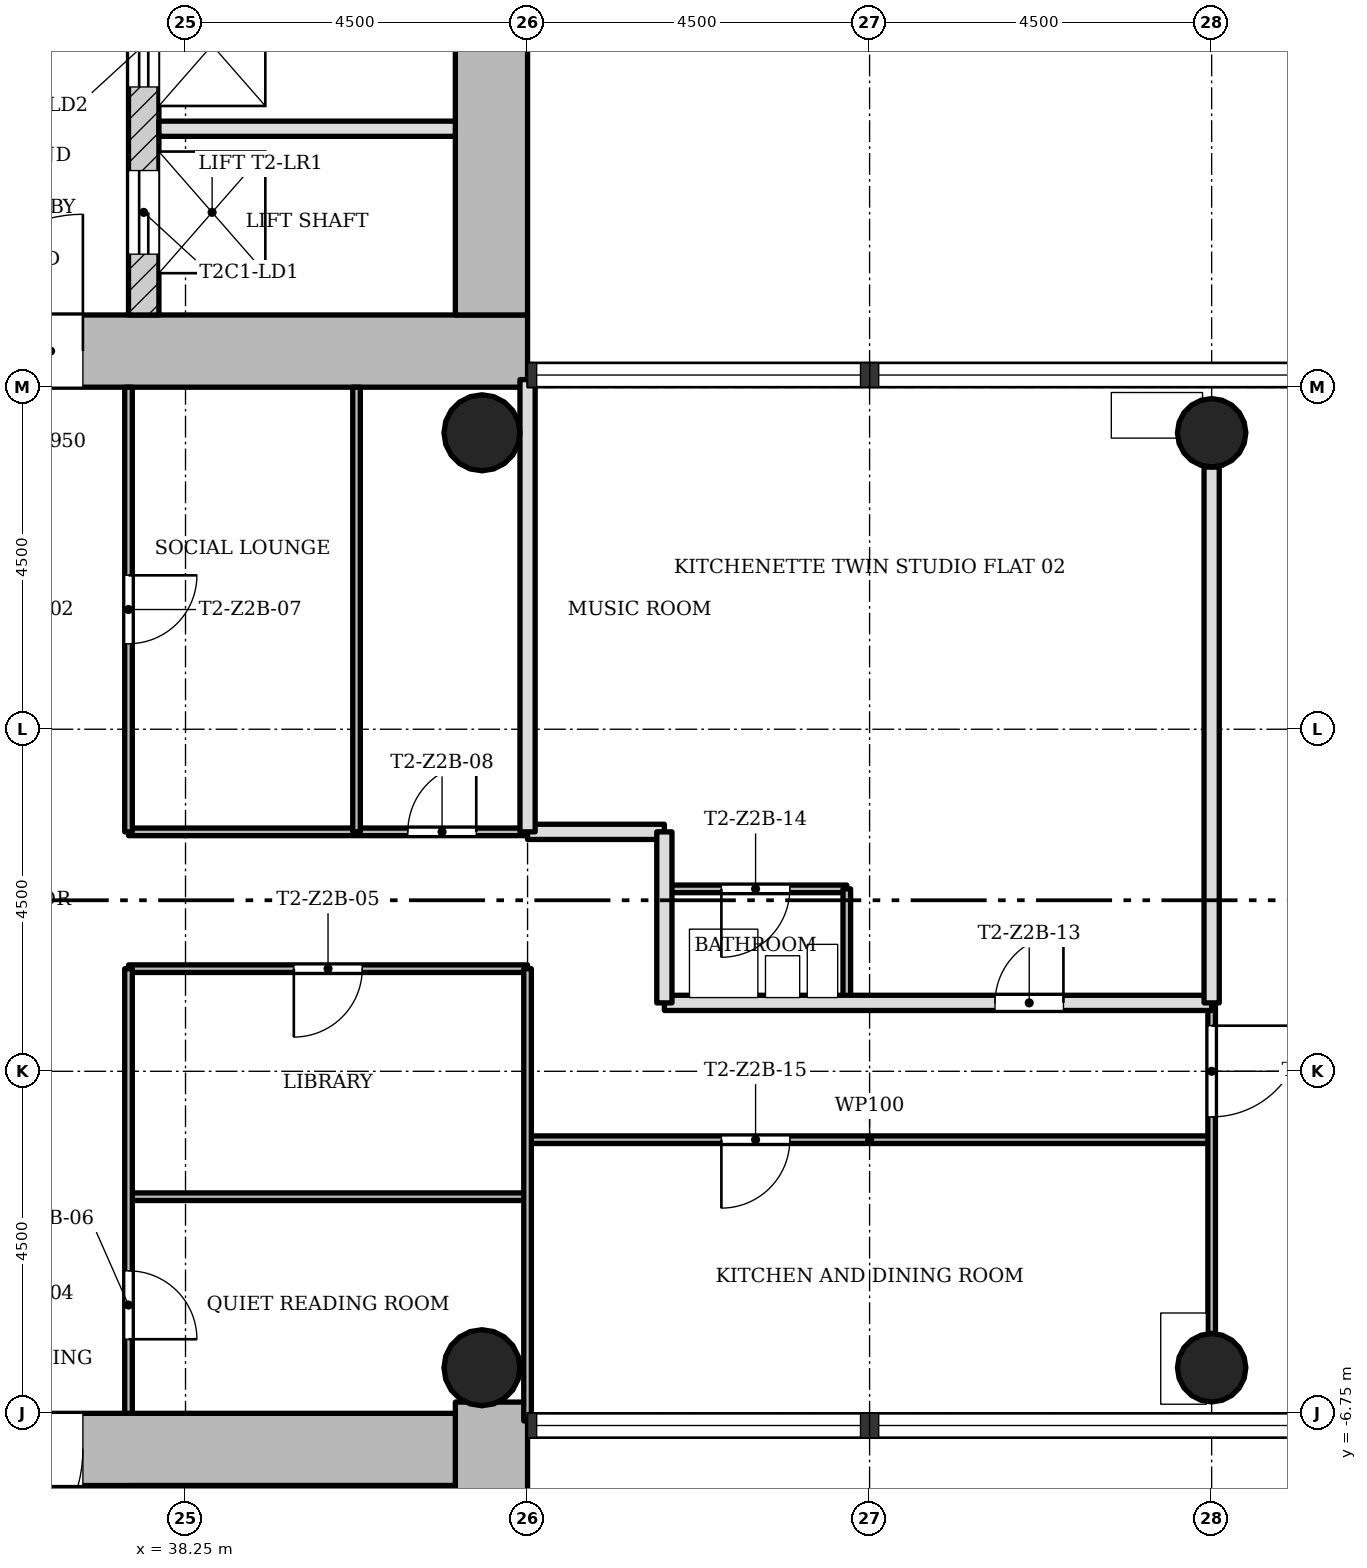
"""IFC4 building model, lengths in metres.
Left out: names, types, materials, properties, quantities, classifications, styles, units other than length and angle.
Written with IfcOpenShell. Run it as: python <this file> out.ifc"""

import sys

from ifc_helpers import new_model, si_unit, direction, frame, frame_2d, origin, origin_2d, place, context, subcontext, project, spatial, rectangle, hollow_circle, extrude, element, fill, save


model = new_model("IFC4")
c1 = context("Model", 3, precision=1e-05, world=origin(), true_north=direction((0.0, 1.0)))
c2 = subcontext(c1, "Body", "Model", "MODEL_VIEW")
j1 = project(units=[si_unit("LENGTHUNIT", "METRE"), si_unit("PLANEANGLEUNIT", "RADIAN")], contexts=[c1])
p1 = place(None, origin())
s1 = spatial("IfcSite", under=j1, at=p1, CompositionType="ELEMENT")
p2 = place(p1, origin())
s2 = spatial("IfcBuilding", under=s1, at=p2, CompositionType="ELEMENT")
p3 = place(p2, frame((0.0, 0.0, 76.6)))
s3 = spatial("IfcBuildingStorey", under=s2, at=p3, CompositionType="ELEMENT", Elevation=76.6)
p4 = place(p3, frame((30.2, 7.225, 0.0), z_axis=(0.0, 0.0, 1.0), x_axis=(1.0, 0.0, 0.0)))
e1 = element("IfcWall", 1, at=p4, inside=s3, PredefinedType="SHEAR", context=c2, shape_type="SweptSolid", body=[
    extrude(rectangle(XDim=12.55, YDim=0.95, at=frame_2d((6.275, 0.0))), origin(), (0.0, 0.0, 1.0), 3.4),
])
p5 = place(p4, frame((4.9, 0.0, 0.0)))
e2 = element("IfcOpeningElement", 2, at=p5, cuts=e1, PredefinedType="OPENING", context=c2, shape_type="SweptSolid", body=[
    extrude(rectangle(XDim=1.8, YDim=2.1, at=frame_2d((0.9, 1.05))), frame((0.0, 0.485, 0.0), z_axis=(0.0, -1.0, 0.0), x_axis=(1.0, 0.0, 0.0)), (0.0, 0.0, 1.0), 0.97),
])
p6 = place(p3, frame((42.275, 7.7, 0.0), z_axis=(0.0, 0.0, 1.0), x_axis=(0.0, 1.0, 0.0)))
e3 = element("IfcWall", 3, at=p6, inside=s3, PredefinedType="SHEAR", context=c2, shape_type="SweptSolid", body=[
    extrude(rectangle(XDim=8.05, YDim=0.95, at=frame_2d((4.025, 0.0))), origin(), (0.0, 0.0, 1.0), 3.4),
])
p7 = place(p3, frame((37.7, 7.7, 0.0), z_axis=(0.0, 0.0, 1.0), x_axis=(0.0, 1.0, 0.0)))
e4 = element("IfcWall", 4, at=p7, inside=s3, PredefinedType="SHEAR", context=c2, shape_type="SweptSolid", body=[
    extrude(rectangle(XDim=7.1, YDim=0.4, at=frame_2d((3.55, 0.0))), origin(), (0.0, 0.0, 1.0), 3.4),
])
p8 = place(p7, frame((0.8, 0.0, 0.0)))
e5 = element("IfcOpeningElement", 5, at=p8, cuts=e4, PredefinedType="OPENING", context=c2, shape_type="SweptSolid", body=[
    extrude(rectangle(XDim=1.1, YDim=2.1, at=frame_2d((0.55, 1.05))), frame((0.0, 0.21, 0.0), z_axis=(0.0, -1.0, 0.0), x_axis=(1.0, 0.0, 0.0)), (0.0, 0.0, 1.0), 0.42),
])
p9 = place(p7, frame((3.0, 0.0, 0.0)))
e6 = element("IfcOpeningElement", 6, at=p9, cuts=e4, PredefinedType="OPENING", context=c2, shape_type="SweptSolid", body=[
    extrude(rectangle(XDim=1.1, YDim=2.1, at=frame_2d((0.55, 1.05))), frame((0.0, 0.21, 0.0), z_axis=(0.0, -1.0, 0.0), x_axis=(1.0, 0.0, 0.0)), (0.0, 0.0, 1.0), 0.42),
])
p10 = place(p7, frame((5.2, 0.0, 0.0)))
e7 = element("IfcOpeningElement", 7, at=p10, cuts=e4, PredefinedType="OPENING", context=c2, shape_type="SweptSolid", body=[
    extrude(rectangle(XDim=1.1, YDim=2.1, at=frame_2d((0.55, 1.05))), frame((0.0, 0.21, 0.0), z_axis=(0.0, -1.0, 0.0), x_axis=(1.0, 0.0, 0.0)), (0.0, 0.0, 1.0), 0.42),
])
p11 = place(p3, frame((42.275, -14.8, 0.0), z_axis=(0.0, 0.0, 1.0), x_axis=(0.0, 1.0, 0.0)))
e8 = element("IfcWall", 8, at=p11, inside=s3, PredefinedType="SHEAR", context=c2, shape_type="SweptSolid", body=[
    extrude(rectangle(XDim=8.198, YDim=0.95, at=frame_2d((4.099, 0.0))), origin(), (0.0, 0.0, 1.0), 3.4),
])
p12 = place(p3, frame((41.8, -7.225, 0.0), z_axis=(0.0, 0.0, 1.0), x_axis=(-1.0, 0.0, 0.0)))
e9 = element("IfcWall", 9, at=p12, inside=s3, PredefinedType="SHEAR", context=c2, shape_type="SweptSolid", body=[
    extrude(rectangle(XDim=12.55, YDim=0.95, at=frame_2d((6.275, 0.0))), origin(), (0.0, 0.0, 1.0), 3.4),
])
p13 = place(p12, frame((4.9, 0.0, 0.0)))
e10 = element("IfcOpeningElement", 10, at=p13, cuts=e9, PredefinedType="OPENING", context=c2, shape_type="SweptSolid", body=[
    extrude(rectangle(XDim=1.8, YDim=2.1, at=frame_2d((0.9, 1.05))), frame((0.0, 0.485, 0.0), z_axis=(0.0, -1.0, 0.0), x_axis=(1.0, 0.0, 0.0)), (0.0, 0.0, 1.0), 0.97),
])
p14 = place(p3, frame((37.7, -14.8, 0.0), z_axis=(0.0, 0.0, 1.0), x_axis=(0.0, 1.0, 0.0)))
e11 = element("IfcWall", 11, at=p14, inside=s3, PredefinedType="SHEAR", context=c2, shape_type="SweptSolid", body=[
    extrude(rectangle(XDim=7.1, YDim=0.4, at=frame_2d((3.55, 0.0))), origin(), (0.0, 0.0, 1.0), 3.4),
])
p15 = place(p14, frame((5.5, 0.0, 0.0)))
e12 = element("IfcOpeningElement", 12, at=p15, cuts=e11, PredefinedType="OPENING", context=c2, shape_type="SweptSolid", body=[
    extrude(rectangle(XDim=0.9, YDim=2.1, at=frame_2d((0.45, 1.05))), frame((0.0, 0.21, 0.0), z_axis=(0.0, -1.0, 0.0), x_axis=(1.0, 0.0, 0.0)), (0.0, 0.0, 1.0), 0.42),
])
for number, where, z_axis, x_axis in (
    (13, (51.75, -6.15, 0.0), (0.0, 0.0, 1.0), (1.0, 0.0, 0.0)),
    (14, (51.75, 6.15, 0.0), (0.0, 0.0, 1.0), (1.0, 0.0, 0.0)),
):
    element("IfcColumn", number, at=place(p3, frame(where, z_axis=z_axis, x_axis=x_axis)), inside=s3, PredefinedType="COLUMN", context=c2, shape_type="SweptSolid", body=[
        extrude(hollow_circle(Radius=0.45, WallThickness=0.032, at=origin_2d()), origin(), (0.0, 0.0, 1.0), 3.4),
    ])
for number, where, z_axis, x_axis in (
    (15, (42.15, -6.15, 0.0), (0.0, 0.0, 1.0), (1.0, 0.0, 0.0)),
    (16, (42.15, 6.15, 0.0), (0.0, 0.0, 1.0), (1.0, 0.0, 0.0)),
):
    element("IfcColumn", number, at=place(p3, frame(where, z_axis=z_axis, x_axis=x_axis)), inside=s3, PredefinedType="COLUMN", context=c2, shape_type="SweptSolid", body=[
        extrude(hollow_circle(Radius=0.5, WallThickness=0.036, at=origin_2d()), origin(), (0.0, 0.0, 1.0), 3.4),
    ])
p16 = place(p3, frame((41.8, 10.15, 0.0), z_axis=(0.0, 0.0, 1.0), x_axis=(-1.0, 0.0, 0.0)))
e17 = element("IfcWall", 17, at=p16, inside=s3, PredefinedType="SOLIDWALL", context=c2, shape_type="SweptSolid", body=[
    extrude(rectangle(XDim=3.9, YDim=0.2, at=frame_2d((1.95, 0.0))), origin(), (0.0, 0.0, 1.0), 3.0),
])
p17 = place(p3, frame((42.75, -3.9, 0.0), z_axis=(0.0, 0.0, 1.0), x_axis=(-1.0, 0.0, 0.0)))
e18 = element("IfcWall", 18, at=p17, inside=s3, PredefinedType="PARTITIONING", context=c2, shape_type="SweptSolid", body=[
    extrude(rectangle(XDim=5.25, YDim=0.1, at=frame_2d((2.625, 0.0))), origin(), (0.0, 0.0, 1.0), 3.0),
])
p18 = place(p3, frame((51.75, -3.15, 0.0), z_axis=(0.0, 0.0, 1.0), x_axis=(-1.0, 0.0, 0.0)))
e19 = element("IfcWall", 19, at=p18, inside=s3, PredefinedType="PARTITIONING", context=c2, shape_type="SweptSolid", body=[
    extrude(rectangle(XDim=9.0, YDim=0.1, at=frame_2d((4.5, 0.0))), origin(), (0.0, 0.0, 1.0), 3.0),
])
p19 = place(p18, frame((5.55, 0.0, 0.0)))
e20 = element("IfcOpeningElement", 20, at=p19, cuts=e19, PredefinedType="OPENING", context=c2, shape_type="SweptSolid", body=[
    extrude(rectangle(XDim=0.9, YDim=2.1, at=frame_2d((0.45, 1.05))), frame((0.0, 0.06, 0.0), z_axis=(0.0, -1.0, 0.0), x_axis=(1.0, 0.0, 0.0)), (0.0, 0.0, 1.0), 0.12),
])
p20 = place(p3, frame((51.75, -1.35, 0.0), z_axis=(0.0, 0.0, 1.0), x_axis=(-1.0, 0.0, 0.0)))
e21 = element("IfcWall", 21, at=p20, inside=s3, PredefinedType="SOLIDWALL", context=c2, shape_type="SweptSolid", body=[
    extrude(rectangle(XDim=7.2, YDim=0.2, at=frame_2d((3.6, 0.0))), origin(), (0.0, 0.0, 1.0), 3.0),
])
p21 = place(p20, frame((1.95, 0.0, 0.0)))
e22 = element("IfcOpeningElement", 22, at=p21, cuts=e21, PredefinedType="OPENING", context=c2, shape_type="SweptSolid", body=[
    extrude(rectangle(XDim=0.9, YDim=2.1, at=frame_2d((0.45, 1.05))), frame((0.0, 0.11, 0.0), z_axis=(0.0, -1.0, 0.0), x_axis=(1.0, 0.0, 0.0)), (0.0, 0.0, 1.0), 0.22),
])
p22 = place(p3, frame((42.75, -0.9, 0.0), z_axis=(0.0, 0.0, 1.0), x_axis=(-1.0, 0.0, 0.0)))
e23 = element("IfcWall", 23, at=p22, inside=s3, PredefinedType="PARTITIONING", context=c2, shape_type="SweptSolid", body=[
    extrude(rectangle(XDim=5.25, YDim=0.1, at=frame_2d((2.625, 0.0))), origin(), (0.0, 0.0, 1.0), 3.0),
])
p23 = place(p22, frame((2.175, 0.0, 0.0)))
e24 = element("IfcOpeningElement", 24, at=p23, cuts=e23, PredefinedType="OPENING", context=c2, shape_type="SweptSolid", body=[
    extrude(rectangle(XDim=0.9, YDim=2.1, at=frame_2d((0.45, 1.05))), frame((0.0, 0.06, 0.0), z_axis=(0.0, -1.0, 0.0), x_axis=(1.0, 0.0, 0.0)), (0.0, 0.0, 1.0), 0.12),
])
p24 = place(p3, frame((46.95, 0.15, 0.0), z_axis=(0.0, 0.0, 1.0), x_axis=(-1.0, 0.0, 0.0)))
e25 = element("IfcWall", 25, at=p24, inside=s3, PredefinedType="PARTITIONING", context=c2, shape_type="SweptSolid", body=[
    extrude(rectangle(XDim=2.4, YDim=0.1, at=frame_2d((1.2, 0.0))), origin(), (0.0, 0.0, 1.0), 3.0),
])
p25 = place(p24, frame((0.75, 0.0, 0.0)))
e26 = element("IfcOpeningElement", 26, at=p25, cuts=e25, PredefinedType="OPENING", context=c2, shape_type="SweptSolid", body=[
    extrude(rectangle(XDim=0.9, YDim=2.1, at=frame_2d((0.45, 1.05))), frame((0.0, 0.06, 0.0), z_axis=(0.0, -1.0, 0.0), x_axis=(1.0, 0.0, 0.0)), (0.0, 0.0, 1.0), 0.12),
])
p26 = place(p3, frame((42.75, 0.9, 0.0), z_axis=(0.0, 0.0, 1.0), x_axis=(-1.0, 0.0, 0.0)))
e27 = element("IfcWall", 27, at=p26, inside=s3, PredefinedType="PARTITIONING", context=c2, shape_type="SweptSolid", body=[
    extrude(rectangle(XDim=5.25, YDim=0.1, at=frame_2d((2.625, 0.0))), origin(), (0.0, 0.0, 1.0), 3.0),
])
p27 = place(p26, frame((0.675, 0.0, 0.0)))
e28 = element("IfcOpeningElement", 28, at=p27, cuts=e27, PredefinedType="OPENING", context=c2, shape_type="SweptSolid", body=[
    extrude(rectangle(XDim=0.9, YDim=2.1, at=frame_2d((0.45, 1.05))), frame((0.0, 0.06, 0.0), z_axis=(0.0, -1.0, 0.0), x_axis=(1.0, 0.0, 0.0)), (0.0, 0.0, 1.0), 0.12),
])
p28 = place(p3, frame((44.55, 0.9, 0.0), z_axis=(0.0, 0.0, 1.0), x_axis=(-1.0, 0.0, 0.0)))
e29 = element("IfcWall", 29, at=p28, inside=s3, PredefinedType="SOLIDWALL", context=c2, shape_type="SweptSolid", body=[
    extrude(rectangle(XDim=1.8, YDim=0.2, at=frame_2d((0.9, 0.0))), origin(), (0.0, 0.0, 1.0), 3.0),
])
p29 = place(p3, frame((51.75, -5.7, 0.0), z_axis=(0.0, 0.0, 1.0), x_axis=(0.0, 1.0, 0.0)))
e30 = element("IfcWall", 30, at=p29, inside=s3, PredefinedType="PARTITIONING", context=c2, shape_type="SweptSolid", body=[
    extrude(rectangle(XDim=4.35, YDim=0.1, at=frame_2d((2.175, 0.0))), origin(), (0.0, 0.0, 1.0), 3.0),
])
p30 = place(p29, frame((2.85, 0.0, 0.0)))
e31 = element("IfcOpeningElement", 31, at=p30, cuts=e30, PredefinedType="OPENING", context=c2, shape_type="SweptSolid", body=[
    extrude(rectangle(XDim=1.2, YDim=2.1, at=frame_2d((0.6, 1.05))), frame((0.0, 0.06, 0.0), z_axis=(0.0, -1.0, 0.0), x_axis=(1.0, 0.0, 0.0)), (0.0, 0.0, 1.0), 0.12),
])
p31 = place(p3, frame((51.75, -1.35, 0.0), z_axis=(0.0, 0.0, 1.0), x_axis=(0.0, 1.0, 0.0)))
e32 = element("IfcWall", 32, at=p31, inside=s3, PredefinedType="SOLIDWALL", context=c2, shape_type="SweptSolid", body=[
    extrude(rectangle(XDim=7.05, YDim=0.2, at=frame_2d((3.525, 0.0))), origin(), (0.0, 0.0, 1.0), 3.0),
])
p32 = place(p3, frame((46.95, -1.35, 0.0), z_axis=(0.0, 0.0, 1.0), x_axis=(0.0, 1.0, 0.0)))
e33 = element("IfcWall", 33, at=p32, inside=s3, PredefinedType="PARTITIONING", context=c2, shape_type="SweptSolid", body=[
    extrude(rectangle(XDim=1.5, YDim=0.1, at=frame_2d((0.75, 0.0))), origin(), (0.0, 0.0, 1.0), 3.0),
])
p33 = place(p3, frame((44.55, -1.35, 0.0), z_axis=(0.0, 0.0, 1.0), x_axis=(0.0, 1.0, 0.0)))
e34 = element("IfcWall", 34, at=p33, inside=s3, PredefinedType="SOLIDWALL", context=c2, shape_type="SweptSolid", body=[
    extrude(rectangle(XDim=2.25, YDim=0.2, at=frame_2d((1.125, 0.0))), origin(), (0.0, 0.0, 1.0), 3.0),
])
p34 = place(p3, frame((42.75, -6.85, 0.0), z_axis=(0.0, 0.0, 1.0), x_axis=(0.0, 1.0, 0.0)))
e35 = element("IfcWall", 35, at=p34, inside=s3, PredefinedType="PARTITIONING", context=c2, shape_type="SweptSolid", body=[
    extrude(rectangle(XDim=5.95, YDim=0.1, at=frame_2d((2.975, 0.0))), origin(), (0.0, 0.0, 1.0), 3.0),
])
p35 = place(p3, frame((42.75, 0.9, 0.0), z_axis=(0.0, 0.0, 1.0), x_axis=(0.0, 1.0, 0.0)))
e36 = element("IfcWall", 36, at=p35, inside=s3, PredefinedType="SOLIDWALL", context=c2, shape_type="SweptSolid", body=[
    extrude(rectangle(XDim=5.95, YDim=0.2, at=frame_2d((2.975, 0.0))), origin(), (0.0, 0.0, 1.0), 3.0),
])
p36 = place(p3, frame((40.5, 0.9, 0.0), z_axis=(0.0, 0.0, 1.0), x_axis=(0.0, 1.0, 0.0)))
e37 = element("IfcWall", 37, at=p36, inside=s3, PredefinedType="PARTITIONING", context=c2, shape_type="SweptSolid", body=[
    extrude(rectangle(XDim=5.85, YDim=0.1, at=frame_2d((2.925, 0.0))), origin(), (0.0, 0.0, 1.0), 3.0),
])
p37 = place(p3, frame((37.5, -6.75, 0.0), z_axis=(0.0, 0.0, 1.0), x_axis=(0.0, 1.0, 0.0)))
e38 = element("IfcWall", 38, at=p37, inside=s3, PredefinedType="PARTITIONING", context=c2, shape_type="SweptSolid", body=[
    extrude(rectangle(XDim=5.85, YDim=0.1, at=frame_2d((2.925, 0.0))), origin(), (0.0, 0.0, 1.0), 3.0),
])
p38 = place(p37, frame((0.975, 0.0, 0.0)))
e39 = element("IfcOpeningElement", 39, at=p38, cuts=e38, PredefinedType="OPENING", context=c2, shape_type="SweptSolid", body=[
    extrude(rectangle(XDim=0.9, YDim=2.1, at=frame_2d((0.45, 1.05))), frame((0.0, 0.06, 0.0), z_axis=(0.0, -1.0, 0.0), x_axis=(1.0, 0.0, 0.0)), (0.0, 0.0, 1.0), 0.12),
])
p39 = place(p3, frame((37.5, 0.9, 0.0), z_axis=(0.0, 0.0, 1.0), x_axis=(0.0, 1.0, 0.0)))
e40 = element("IfcWall", 40, at=p39, inside=s3, PredefinedType="PARTITIONING", context=c2, shape_type="SweptSolid", body=[
    extrude(rectangle(XDim=5.85, YDim=0.1, at=frame_2d((2.925, 0.0))), origin(), (0.0, 0.0, 1.0), 3.0),
])
p40 = place(p39, frame((2.475, 0.0, 0.0)))
e41 = element("IfcOpeningElement", 41, at=p40, cuts=e40, PredefinedType="OPENING", context=c2, shape_type="SweptSolid", body=[
    extrude(rectangle(XDim=0.9, YDim=2.1, at=frame_2d((0.45, 1.05))), frame((0.0, 0.06, 0.0), z_axis=(0.0, -1.0, 0.0), x_axis=(1.0, 0.0, 0.0)), (0.0, 0.0, 1.0), 0.12),
])
p41 = place(p3, frame((37.9, -7.825, 0.0), z_axis=(0.0, 0.0, 1.0), x_axis=(1.0, 0.0, 0.0)))
e42 = element("IfcWall", 42, at=p41, inside=s3, PredefinedType="SHEAR", context=c2, shape_type="SweptSolid", body=[
    extrude(rectangle(XDim=3.9, YDim=0.25, at=frame_2d((1.95, 0.0))), origin(), (0.0, 0.0, 1.0), 3.4),
])
p42 = place(p23, origin())
e43 = element("IfcDoor", 43, at=p42, inside=s3, OperationType="SINGLE_SWING_LEFT", PredefinedType="DOOR", context=c2, shape_type="SweptSolid", body=[
    extrude(rectangle(XDim=0.9, YDim=2.1, at=frame_2d((0.45, 1.05))), frame((0.0, 0.025, 0.0), z_axis=(0.0, -1.0, 0.0), x_axis=(1.0, 0.0, 0.0)), (0.0, 0.0, 1.0), 0.05),
])
fill(e24, e43)
p43 = place(p38, origin())
e44 = element("IfcDoor", 44, at=p43, inside=s3, OperationType="SINGLE_SWING_LEFT", PredefinedType="DOOR", context=c2, shape_type="SweptSolid", body=[
    extrude(rectangle(XDim=0.9, YDim=2.1, at=frame_2d((0.45, 1.05))), frame((0.0, 0.025, 0.0), z_axis=(0.0, -1.0, 0.0), x_axis=(1.0, 0.0, 0.0)), (0.0, 0.0, 1.0), 0.05),
])
fill(e39, e44)
p44 = place(p40, origin())
e45 = element("IfcDoor", 45, at=p44, inside=s3, OperationType="SINGLE_SWING_RIGHT", PredefinedType="DOOR", context=c2, shape_type="SweptSolid", body=[
    extrude(rectangle(XDim=0.9, YDim=2.1, at=frame_2d((0.45, 1.05))), frame((0.0, 0.025, 0.0), z_axis=(0.0, -1.0, 0.0), x_axis=(1.0, 0.0, 0.0)), (0.0, 0.0, 1.0), 0.05),
])
fill(e41, e45)
p45 = place(p27, origin())
e46 = element("IfcDoor", 46, at=p45, inside=s3, OperationType="SINGLE_SWING_LEFT", PredefinedType="DOOR", context=c2, shape_type="SweptSolid", body=[
    extrude(rectangle(XDim=0.9, YDim=2.1, at=frame_2d((0.45, 1.05))), frame((0.0, 0.025, 0.0), z_axis=(0.0, -1.0, 0.0), x_axis=(1.0, 0.0, 0.0)), (0.0, 0.0, 1.0), 0.05),
])
fill(e28, e46)
p46 = place(p21, origin())
e47 = element("IfcDoor", 47, at=p46, inside=s3, OperationType="SINGLE_SWING_LEFT", PredefinedType="DOOR", context=c2, shape_type="SweptSolid", body=[
    extrude(rectangle(XDim=0.9, YDim=2.1, at=frame_2d((0.45, 1.05))), frame((0.0, 0.025, 0.0), z_axis=(0.0, -1.0, 0.0), x_axis=(1.0, 0.0, 0.0)), (0.0, 0.0, 1.0), 0.05),
])
fill(e22, e47)
p47 = place(p25, origin())
e48 = element("IfcDoor", 48, at=p47, inside=s3, OperationType="SINGLE_SWING_LEFT", PredefinedType="DOOR", context=c2, shape_type="SweptSolid", body=[
    extrude(rectangle(XDim=0.9, YDim=2.1, at=frame_2d((0.45, 1.05))), frame((0.0, 0.025, 0.0), z_axis=(0.0, -1.0, 0.0), x_axis=(1.0, 0.0, 0.0)), (0.0, 0.0, 1.0), 0.05),
])
fill(e26, e48)
p48 = place(p19, origin())
e49 = element("IfcDoor", 49, at=p48, inside=s3, OperationType="SINGLE_SWING_LEFT", PredefinedType="DOOR", context=c2, shape_type="SweptSolid", body=[
    extrude(rectangle(XDim=0.9, YDim=2.1, at=frame_2d((0.45, 1.05))), frame((0.0, 0.025, 0.0), z_axis=(0.0, -1.0, 0.0), x_axis=(1.0, 0.0, 0.0)), (0.0, 0.0, 1.0), 0.05),
])
fill(e20, e49)
p49 = place(p30, origin())
e50 = element("IfcDoor", 50, at=p49, inside=s3, OperationType="SINGLE_SWING_RIGHT", PredefinedType="DOOR", context=c2, shape_type="SweptSolid", body=[
    extrude(rectangle(XDim=1.2, YDim=2.1, at=frame_2d((0.6, 1.05))), frame((0.0, 0.025, 0.0), z_axis=(0.0, -1.0, 0.0), x_axis=(1.0, 0.0, 0.0)), (0.0, 0.0, 1.0), 0.05),
])
fill(e31, e50)
p50 = place(p8, origin())
e51 = element("IfcDoor", 51, at=p50, inside=s3, OperationType="SLIDING_TO_LEFT", PredefinedType="DOOR", context=c2, shape_type="SweptSolid", body=[
    extrude(rectangle(XDim=1.1, YDim=2.1, at=frame_2d((0.55, 1.05))), frame((0.0, 0.025, 0.0), z_axis=(0.0, -1.0, 0.0), x_axis=(1.0, 0.0, 0.0)), (0.0, 0.0, 1.0), 0.05),
])
fill(e5, e51)
p51 = place(p9, origin())
e52 = element("IfcDoor", 52, at=p51, inside=s3, OperationType="SLIDING_TO_LEFT", PredefinedType="DOOR", context=c2, shape_type="SweptSolid", body=[
    extrude(rectangle(XDim=1.1, YDim=2.1, at=frame_2d((0.55, 1.05))), frame((0.0, 0.025, 0.0), z_axis=(0.0, -1.0, 0.0), x_axis=(1.0, 0.0, 0.0)), (0.0, 0.0, 1.0), 0.05),
])
fill(e6, e52)
p52 = place(p5, origin())
e53 = element("IfcDoor", 53, at=p52, inside=s3, OperationType="SINGLE_SWING_LEFT", PredefinedType="DOOR", context=c2, shape_type="SweptSolid", body=[
    extrude(rectangle(XDim=1.8, YDim=2.1, at=frame_2d((0.9, 1.05))), frame((0.0, 0.025, 0.0), z_axis=(0.0, -1.0, 0.0), x_axis=(1.0, 0.0, 0.0)), (0.0, 0.0, 1.0), 0.05),
])
fill(e2, e53)
p53 = place(p13, origin())
e54 = element("IfcDoor", 54, at=p53, inside=s3, OperationType="SINGLE_SWING_LEFT", PredefinedType="DOOR", context=c2, shape_type="SweptSolid", body=[
    extrude(rectangle(XDim=1.8, YDim=2.1, at=frame_2d((0.9, 1.05))), frame((0.0, 0.025, 0.0), z_axis=(0.0, -1.0, 0.0), x_axis=(1.0, 0.0, 0.0)), (0.0, 0.0, 1.0), 0.05),
])
fill(e10, e54)
save(model, sys.argv[1])
